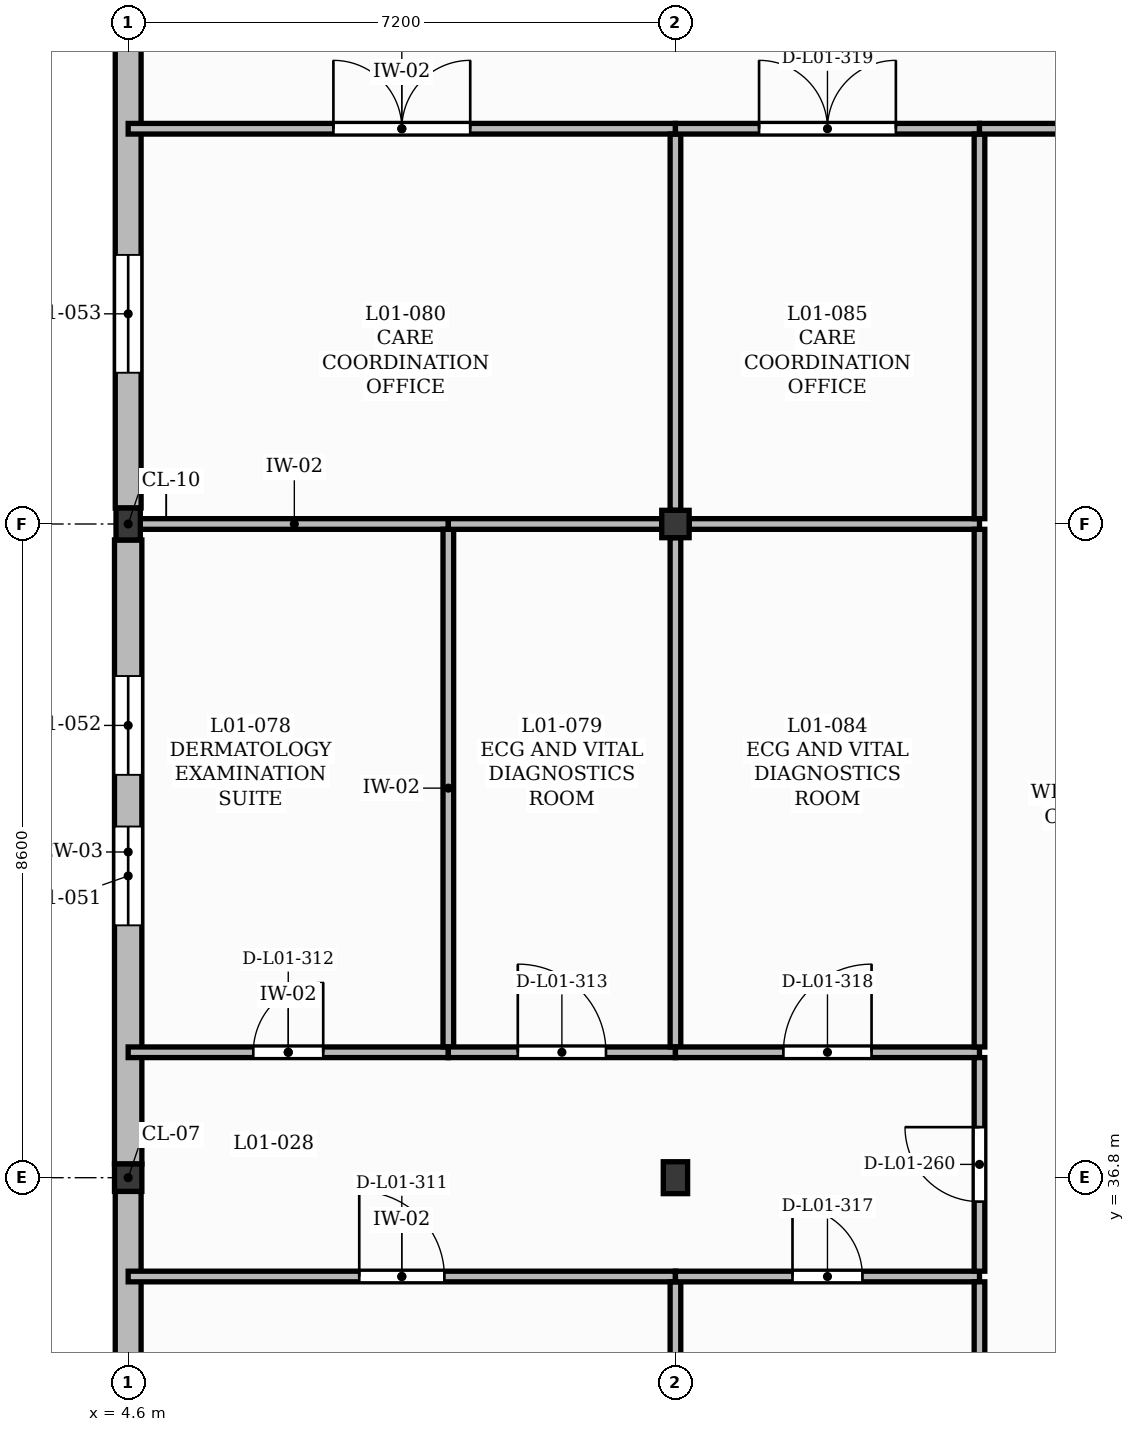
"""IFC4 building model, lengths in metres.
Left out: names, types, materials, properties, quantities, classifications, styles, units other than length and angle.
Written with IfcOpenShell. Run it as: python <this file> out.ifc"""

import sys

from ifc_helpers import new_model, si_unit, direction, frame, frame_2d, origin, origin_2d, place, context, subcontext, project, spatial, rectangle, extrude, element, fill, save


model = new_model("IFC4")
c1 = context("Model", 3, precision=1e-05, world=origin(), true_north=direction((0.0, 1.0)))
c2 = subcontext(c1, "Body", "Model", "MODEL_VIEW")
j1 = project(units=[si_unit("LENGTHUNIT", "METRE"), si_unit("PLANEANGLEUNIT", "RADIAN")], contexts=[c1])
p1 = place(None, origin())
s1 = spatial("IfcSite", under=j1, at=p1, CompositionType="ELEMENT")
p2 = place(p1, origin())
s2 = spatial("IfcBuilding", under=s1, at=p2, CompositionType="ELEMENT")
p3 = place(p2, frame((0.0, 0.0, 4.5)))
s3 = spatial("IfcBuildingStorey", under=s2, at=p3, CompositionType="ELEMENT", Elevation=4.5)
p4 = place(p3, frame((4.6, 36.8, 0.0), z_axis=(0.0, 0.0, 1.0), x_axis=(1.0, 0.0, 0.0)))
e1 = element("IfcColumn", 1, at=p4, inside=s3, PredefinedType="COLUMN", context=c2, shape_type="SweptSolid", body=[
    extrude(rectangle(XDim=0.36, YDim=0.36, at=origin_2d()), origin(), (0.0, 0.0, 1.0), 4.26),
])
for number, where, z_axis, x_axis in (
    (2, (4.6, 45.4, 0.0), (0.0, 0.0, 1.0), (1.0, 0.0, 0.0)),
    (3, (11.8, 36.8, 0.0), (0.0, 0.0, 1.0), (1.0, 0.0, 0.0)),
):
    element("IfcColumn", number, at=place(p3, frame(where, z_axis=z_axis, x_axis=x_axis)), inside=s3, PredefinedType="COLUMN", context=c2, shape_type="SweptSolid", body=[
        extrude(rectangle(XDim=0.32, YDim=0.42, at=origin_2d()), origin(), (0.0, 0.0, 1.0), 4.26),
    ])
p5 = place(p3, frame((11.8, 45.4, 0.0), z_axis=(0.0, 0.0, 1.0), x_axis=(1.0, 0.0, 0.0)))
e4 = element("IfcColumn", 4, at=p5, inside=s3, PredefinedType="COLUMN", context=c2, shape_type="SweptSolid", body=[
    extrude(rectangle(XDim=0.36, YDim=0.36, at=origin_2d()), origin(), (0.0, 0.0, 1.0), 4.26),
])
p6 = place(p3, frame((4.6, 27.41, 0.0), z_axis=(0.0, 0.0, 1.0), x_axis=(0.0, 1.0, 0.0)))
e5 = element("IfcWall", 5, at=p6, inside=s3, PredefinedType="SOLIDWALL", context=c2, shape_type="SweptSolid", body=[
    extrude(rectangle(XDim=9.21, YDim=0.34, at=frame_2d((4.605, 0.0))), origin(), (0.0, 0.0, 1.0), 3.8),
])
p7 = place(p6, frame((3.475, 0.0, 0.9)))
e6 = element("IfcOpeningElement", 6, at=p7, cuts=e5, PredefinedType="OPENING", context=c2, shape_type="SweptSolid", body=[
    extrude(rectangle(XDim=1.42, YDim=2.4, at=frame_2d((0.71, 1.2))), frame((0.0, 0.18, 0.0), z_axis=(0.0, -1.0, 0.0), x_axis=(1.0, 0.0, 0.0)), (0.0, 0.0, 1.0), 0.36),
])
p8 = place(p6, frame((5.575, 0.0, 0.9)))
e7 = element("IfcOpeningElement", 7, at=p8, cuts=e5, PredefinedType="OPENING", context=c2, shape_type="SweptSolid", body=[
    extrude(rectangle(XDim=1.42, YDim=2.4, at=frame_2d((0.71, 1.2))), frame((0.0, 0.18, 0.0), z_axis=(0.0, -1.0, 0.0), x_axis=(1.0, 0.0, 0.0)), (0.0, 0.0, 1.0), 0.36),
])
p9 = place(p3, frame((4.6, 36.98, 0.0), z_axis=(0.0, 0.0, 1.0), x_axis=(0.0, 1.0, 0.0)))
e8 = element("IfcWall", 8, at=p9, inside=s3, PredefinedType="SOLIDWALL", context=c2, shape_type="SweptSolid", body=[
    extrude(rectangle(XDim=8.21, YDim=0.36, at=frame_2d((4.105, 0.0))), origin(), (0.0, 0.0, 1.0), 3.8),
])
p10 = place(p9, frame((3.14, 0.0, 0.9)))
e9 = element("IfcOpeningElement", 9, at=p10, cuts=e8, PredefinedType="OPENING", context=c2, shape_type="SweptSolid", body=[
    extrude(rectangle(XDim=1.3, YDim=2.4, at=frame_2d((0.65, 1.2))), frame((0.0, 0.19, 0.0), z_axis=(0.0, -1.0, 0.0), x_axis=(1.0, 0.0, 0.0)), (0.0, 0.0, 1.0), 0.38),
])
p11 = place(p9, frame((5.12, 0.0, 0.9)))
e10 = element("IfcOpeningElement", 10, at=p11, cuts=e8, PredefinedType="OPENING", context=c2, shape_type="SweptSolid", body=[
    extrude(rectangle(XDim=1.3, YDim=2.4, at=frame_2d((0.65, 1.2))), frame((0.0, 0.19, 0.0), z_axis=(0.0, -1.0, 0.0), x_axis=(1.0, 0.0, 0.0)), (0.0, 0.0, 1.0), 0.38),
])
p12 = place(p3, frame((4.6, 45.61, 0.0), z_axis=(0.0, 0.0, 1.0), x_axis=(0.0, 1.0, 0.0)))
e11 = element("IfcWall", 11, at=p12, inside=s3, PredefinedType="SOLIDWALL", context=c2, shape_type="SweptSolid", body=[
    extrude(rectangle(XDim=6.81, YDim=0.34, at=frame_2d((3.405, 0.0))), origin(), (0.0, 0.0, 1.0), 3.8),
])
p13 = place(p12, frame((1.78, 0.0, 0.9)))
e12 = element("IfcOpeningElement", 12, at=p13, cuts=e11, PredefinedType="OPENING", context=c2, shape_type="SweptSolid", body=[
    extrude(rectangle(XDim=1.55, YDim=2.4, at=frame_2d((0.775, 1.2))), frame((0.0, 0.18, 0.0), z_axis=(0.0, -1.0, 0.0), x_axis=(1.0, 0.0, 0.0)), (0.0, 0.0, 1.0), 0.36),
])
p14 = place(p3, frame((4.6, 35.5, 0.0), z_axis=(0.0, 0.0, 1.0), x_axis=(1.0, 0.0, 0.0)))
e13 = element("IfcWall", 13, at=p14, inside=s3, PredefinedType="PARTITIONING", context=c2, shape_type="SweptSolid", body=[
    extrude(rectangle(XDim=7.2, YDim=0.14, at=frame_2d((3.6, 0.0))), origin(), (0.0, 0.0, 1.0), 4.18),
])
p15 = place(p14, frame((3.04, 0.0, 0.0)))
e14 = element("IfcOpeningElement", 14, at=p15, cuts=e13, PredefinedType="OPENING", context=c2, shape_type="SweptSolid", body=[
    extrude(rectangle(XDim=1.12, YDim=2.15, at=frame_2d((0.56, 1.075))), frame((0.0, 0.08, 0.0), z_axis=(0.0, -1.0, 0.0), x_axis=(1.0, 0.0, 0.0)), (0.0, 0.0, 1.0), 0.16),
])
p16 = place(p3, frame((4.6, 38.45, 0.0), z_axis=(0.0, 0.0, 1.0), x_axis=(1.0, 0.0, 0.0)))
e15 = element("IfcWall", 15, at=p16, inside=s3, PredefinedType="PARTITIONING", context=c2, shape_type="SweptSolid", body=[
    extrude(rectangle(XDim=4.212, YDim=0.14, at=frame_2d((2.106, 0.0))), origin(), (0.0, 0.0, 1.0), 4.18),
])
p17 = place(p16, frame((1.646, 0.0, 0.0)))
e16 = element("IfcOpeningElement", 16, at=p17, cuts=e15, PredefinedType="OPENING", context=c2, shape_type="SweptSolid", body=[
    extrude(rectangle(XDim=0.92, YDim=2.1, at=frame_2d((0.46, 1.05))), frame((0.0, 0.08, 0.0), z_axis=(0.0, -1.0, 0.0), x_axis=(1.0, 0.0, 0.0)), (0.0, 0.0, 1.0), 0.16),
])
p18 = place(p3, frame((4.76, 45.4, 0.0), z_axis=(0.0, 0.0, 1.0), x_axis=(1.0, 0.0, 0.0)))
e17 = element("IfcWall", 17, at=p18, inside=s3, PredefinedType="PARTITIONING", context=c2, shape_type="SweptSolid", body=[
    extrude(rectangle(XDim=4.052, YDim=0.14, at=frame_2d((2.026, 0.0))), origin(), (0.0, 0.0, 1.0), 3.66),
])
p19 = place(p3, frame((4.6, 50.6, 0.0), z_axis=(0.0, 0.0, 1.0), x_axis=(1.0, 0.0, 0.0)))
e18 = element("IfcWall", 18, at=p19, inside=s3, PredefinedType="PARTITIONING", context=c2, shape_type="SweptSolid", body=[
    extrude(rectangle(XDim=7.2, YDim=0.14, at=frame_2d((3.6, 0.0))), origin(), (0.0, 0.0, 1.0), 4.18),
])
p20 = place(p19, frame((2.7, 0.0, 0.0)))
e19 = element("IfcOpeningElement", 19, at=p20, cuts=e18, PredefinedType="OPENING", context=c2, shape_type="SweptSolid", body=[
    extrude(rectangle(XDim=1.8, YDim=2.3, at=frame_2d((0.9, 1.15))), frame((0.0, 0.08, 0.0), z_axis=(0.0, -1.0, 0.0), x_axis=(1.0, 0.0, 0.0)), (0.0, 0.0, 1.0), 0.16),
])
p21 = place(p3, frame((8.812, 38.52, 0.0), z_axis=(0.0, 0.0, 1.0), x_axis=(0.0, 1.0, 0.0)))
e20 = element("IfcWall", 20, at=p21, inside=s3, PredefinedType="PARTITIONING", context=c2, shape_type="SweptSolid", body=[
    extrude(rectangle(XDim=6.81, YDim=0.14, at=frame_2d((3.405, 0.0))), origin(), (0.0, 0.0, 1.0), 4.18),
])
p22 = place(p3, frame((8.812, 38.45, 0.0), z_axis=(0.0, 0.0, 1.0), x_axis=(1.0, 0.0, 0.0)))
e21 = element("IfcWall", 21, at=p22, inside=s3, PredefinedType="PARTITIONING", context=c2, shape_type="SweptSolid", body=[
    extrude(rectangle(XDim=2.988, YDim=0.14, at=frame_2d((1.494, 0.0))), origin(), (0.0, 0.0, 1.0), 4.18),
])
p23 = place(p22, frame((0.914, 0.0, 0.0)))
e22 = element("IfcOpeningElement", 22, at=p23, cuts=e21, PredefinedType="OPENING", context=c2, shape_type="SweptSolid", body=[
    extrude(rectangle(XDim=1.16, YDim=2.1, at=frame_2d((0.58, 1.05))), frame((0.0, 0.08, 0.0), z_axis=(0.0, -1.0, 0.0), x_axis=(1.0, 0.0, 0.0)), (0.0, 0.0, 1.0), 0.16),
])
p24 = place(p3, frame((8.812, 45.4, 0.0), z_axis=(0.0, 0.0, 1.0), x_axis=(1.0, 0.0, 0.0)))
e23 = element("IfcWall", 23, at=p24, inside=s3, PredefinedType="PARTITIONING", context=c2, shape_type="SweptSolid", body=[
    extrude(rectangle(XDim=2.808, YDim=0.14, at=frame_2d((1.404, 0.0))), origin(), (0.0, 0.0, 1.0), 3.66),
])
p25 = place(p3, frame((11.8, 31.279, 0.0), z_axis=(0.0, 0.0, 1.0), x_axis=(0.0, 1.0, 0.0)))
e24 = element("IfcWall", 24, at=p25, inside=s3, PredefinedType="PARTITIONING", context=c2, shape_type="SweptSolid", body=[
    extrude(rectangle(XDim=4.151, YDim=0.14, at=frame_2d((2.075, 0.0))), origin(), (0.0, 0.0, 1.0), 3.62),
])
p26 = place(p3, frame((11.8, 35.5, 0.0), z_axis=(0.0, 0.0, 1.0), x_axis=(1.0, 0.0, 0.0)))
e25 = element("IfcWall", 25, at=p26, inside=s3, PredefinedType="PARTITIONING", context=c2, shape_type="SweptSolid", body=[
    extrude(rectangle(XDim=4.0, YDim=0.14, at=frame_2d((2.0, 0.0))), origin(), (0.0, 0.0, 1.0), 4.18),
])
p27 = place(p26, frame((1.54, 0.0, 0.0)))
e26 = element("IfcOpeningElement", 26, at=p27, cuts=e25, PredefinedType="OPENING", context=c2, shape_type="SweptSolid", body=[
    extrude(rectangle(XDim=0.92, YDim=2.1, at=frame_2d((0.46, 1.05))), frame((0.0, 0.08, 0.0), z_axis=(0.0, -1.0, 0.0), x_axis=(1.0, 0.0, 0.0)), (0.0, 0.0, 1.0), 0.16),
])
p28 = place(p3, frame((11.8, 38.52, 0.0), z_axis=(0.0, 0.0, 1.0), x_axis=(0.0, 1.0, 0.0)))
e27 = element("IfcWall", 27, at=p28, inside=s3, PredefinedType="PARTITIONING", context=c2, shape_type="SweptSolid", body=[
    extrude(rectangle(XDim=6.7, YDim=0.14, at=frame_2d((3.35, 0.0))), origin(), (0.0, 0.0, 1.0), 3.62),
])
p29 = place(p3, frame((11.8, 38.45, 0.0), z_axis=(0.0, 0.0, 1.0), x_axis=(1.0, 0.0, 0.0)))
e28 = element("IfcWall", 28, at=p29, inside=s3, PredefinedType="PARTITIONING", context=c2, shape_type="SweptSolid", body=[
    extrude(rectangle(XDim=4.0, YDim=0.14, at=frame_2d((2.0, 0.0))), origin(), (0.0, 0.0, 1.0), 4.18),
])
p30 = place(p29, frame((1.42, 0.0, 0.0)))
e29 = element("IfcOpeningElement", 29, at=p30, cuts=e28, PredefinedType="OPENING", context=c2, shape_type="SweptSolid", body=[
    extrude(rectangle(XDim=1.16, YDim=2.1, at=frame_2d((0.58, 1.05))), frame((0.0, 0.08, 0.0), z_axis=(0.0, -1.0, 0.0), x_axis=(1.0, 0.0, 0.0)), (0.0, 0.0, 1.0), 0.16),
])
p31 = place(p3, frame((11.8, 45.58, 0.0), z_axis=(0.0, 0.0, 1.0), x_axis=(0.0, 1.0, 0.0)))
e30 = element("IfcWall", 30, at=p31, inside=s3, PredefinedType="PARTITIONING", context=c2, shape_type="SweptSolid", body=[
    extrude(rectangle(XDim=4.95, YDim=0.14, at=frame_2d((2.475, 0.0))), origin(), (0.0, 0.0, 1.0), 3.74),
])
p32 = place(p3, frame((11.98, 45.4, 0.0), z_axis=(0.0, 0.0, 1.0), x_axis=(1.0, 0.0, 0.0)))
e31 = element("IfcWall", 31, at=p32, inside=s3, PredefinedType="PARTITIONING", context=c2, shape_type="SweptSolid", body=[
    extrude(rectangle(XDim=3.82, YDim=0.14, at=frame_2d((1.91, 0.0))), origin(), (0.0, 0.0, 1.0), 3.62),
])
p33 = place(p3, frame((11.8, 50.6, 0.0), z_axis=(0.0, 0.0, 1.0), x_axis=(1.0, 0.0, 0.0)))
e32 = element("IfcWall", 32, at=p33, inside=s3, PredefinedType="PARTITIONING", context=c2, shape_type="SweptSolid", body=[
    extrude(rectangle(XDim=4.0, YDim=0.14, at=frame_2d((2.0, 0.0))), origin(), (0.0, 0.0, 1.0), 4.18),
])
p34 = place(p33, frame((1.1, 0.0, 0.0)))
e33 = element("IfcOpeningElement", 33, at=p34, cuts=e32, PredefinedType="OPENING", context=c2, shape_type="SweptSolid", body=[
    extrude(rectangle(XDim=1.8, YDim=2.3, at=frame_2d((0.9, 1.15))), frame((0.0, 0.08, 0.0), z_axis=(0.0, -1.0, 0.0), x_axis=(1.0, 0.0, 0.0)), (0.0, 0.0, 1.0), 0.16),
])
p35 = place(p3, frame((15.8, 31.279, 0.0), z_axis=(0.0, 0.0, 1.0), x_axis=(0.0, 1.0, 0.0)))
e34 = element("IfcWall", 34, at=p35, inside=s3, PredefinedType="PARTITIONING", context=c2, shape_type="SweptSolid", body=[
    extrude(rectangle(XDim=4.151, YDim=0.14, at=frame_2d((2.075, 0.0))), origin(), (0.0, 0.0, 1.0), 4.18),
])
p36 = place(p3, frame((15.8, 35.57, 0.0), z_axis=(0.0, 0.0, 1.0), x_axis=(0.0, 1.0, 0.0)))
e35 = element("IfcWall", 35, at=p36, inside=s3, PredefinedType="PARTITIONING", context=c2, shape_type="SweptSolid", body=[
    extrude(rectangle(XDim=2.81, YDim=0.14, at=frame_2d((1.405, 0.0))), origin(), (0.0, 0.0, 1.0), 4.18),
])
p37 = place(p36, frame((0.915, 0.0, 0.0)))
e36 = element("IfcOpeningElement", 36, at=p37, cuts=e35, PredefinedType="OPENING", context=c2, shape_type="SweptSolid", body=[
    extrude(rectangle(XDim=0.98, YDim=2.15, at=frame_2d((0.49, 1.075))), frame((0.0, 0.08, 0.0), z_axis=(0.0, -1.0, 0.0), x_axis=(1.0, 0.0, 0.0)), (0.0, 0.0, 1.0), 0.16),
])
p38 = place(p3, frame((15.8, 38.52, 0.0), z_axis=(0.0, 0.0, 1.0), x_axis=(0.0, 1.0, 0.0)))
e37 = element("IfcWall", 37, at=p38, inside=s3, PredefinedType="PARTITIONING", context=c2, shape_type="SweptSolid", body=[
    extrude(rectangle(XDim=6.81, YDim=0.14, at=frame_2d((3.405, 0.0))), origin(), (0.0, 0.0, 1.0), 4.18),
])
p39 = place(p3, frame((15.8, 45.47, 0.0), z_axis=(0.0, 0.0, 1.0), x_axis=(0.0, 1.0, 0.0)))
e38 = element("IfcWall", 38, at=p39, inside=s3, PredefinedType="PARTITIONING", context=c2, shape_type="SweptSolid", body=[
    extrude(rectangle(XDim=5.06, YDim=0.14, at=frame_2d((2.53, 0.0))), origin(), (0.0, 0.0, 1.0), 4.18),
])
p40 = place(p3, frame((15.8, 50.6, 0.0), z_axis=(0.0, 0.0, 1.0), x_axis=(1.0, 0.0, 0.0)))
e39 = element("IfcWall", 39, at=p40, inside=s3, PredefinedType="PARTITIONING", context=c2, shape_type="SweptSolid", body=[
    extrude(rectangle(XDim=3.2, YDim=0.14, at=frame_2d((1.6, 0.0))), origin(), (0.0, 0.0, 1.0), 4.18),
])
p41 = place(p40, frame((1.08, 0.0, 0.0)))
e40 = element("IfcOpeningElement", 40, at=p41, cuts=e39, PredefinedType="OPENING", context=c2, shape_type="SweptSolid", body=[
    extrude(rectangle(XDim=1.04, YDim=2.1, at=frame_2d((0.52, 1.05))), frame((0.0, 0.08, 0.0), z_axis=(0.0, -1.0, 0.0), x_axis=(1.0, 0.0, 0.0)), (0.0, 0.0, 1.0), 0.16),
])
p42 = place(p10, origin())
e41 = element("IfcWindow", 41, at=p42, inside=s3, PartitioningType="SINGLE_PANEL", PredefinedType="WINDOW", context=c2, shape_type="SweptSolid", body=[
    extrude(rectangle(XDim=1.3, YDim=2.4, at=frame_2d((0.65, 1.2))), frame((0.0, 0.03, 0.0), z_axis=(0.0, -1.0, 0.0), x_axis=(1.0, 0.0, 0.0)), (0.0, 0.0, 1.0), 0.06),
])
fill(e9, e41)
p43 = place(p11, origin())
e42 = element("IfcWindow", 42, at=p43, inside=s3, PartitioningType="SINGLE_PANEL", PredefinedType="WINDOW", context=c2, shape_type="SweptSolid", body=[
    extrude(rectangle(XDim=1.3, YDim=2.4, at=frame_2d((0.65, 1.2))), frame((0.0, 0.03, 0.0), z_axis=(0.0, -1.0, 0.0), x_axis=(1.0, 0.0, 0.0)), (0.0, 0.0, 1.0), 0.06),
])
fill(e10, e42)
p44 = place(p13, origin())
e43 = element("IfcWindow", 43, at=p44, inside=s3, PartitioningType="DOUBLE_PANEL_VERTICAL", PredefinedType="WINDOW", context=c2, shape_type="SweptSolid", body=[
    extrude(rectangle(XDim=1.55, YDim=2.4, at=frame_2d((0.775, 1.2))), frame((0.0, 0.03, 0.0), z_axis=(0.0, -1.0, 0.0), x_axis=(1.0, 0.0, 0.0)), (0.0, 0.0, 1.0), 0.06),
])
fill(e12, e43)
p45 = place(p37, origin())
e44 = element("IfcDoor", 44, at=p45, inside=s3, OperationType="SINGLE_SWING_RIGHT", PredefinedType="DOOR", context=c2, shape_type="SweptSolid", body=[
    extrude(rectangle(XDim=0.98, YDim=2.15, at=frame_2d((0.49, 1.075))), frame((0.0, 0.025, 0.0), z_axis=(0.0, -1.0, 0.0), x_axis=(1.0, 0.0, 0.0)), (0.0, 0.0, 1.0), 0.05),
])
fill(e36, e44)
p46 = place(p15, origin())
e45 = element("IfcDoor", 45, at=p46, inside=s3, OperationType="SINGLE_SWING_LEFT", PredefinedType="DOOR", context=c2, shape_type="SweptSolid", body=[
    extrude(rectangle(XDim=1.12, YDim=2.15, at=frame_2d((0.56, 1.075))), frame((0.0, 0.025, 0.0), z_axis=(0.0, -1.0, 0.0), x_axis=(1.0, 0.0, 0.0)), (0.0, 0.0, 1.0), 0.05),
])
fill(e14, e45)
p47 = place(p17, origin())
e46 = element("IfcDoor", 46, at=p47, inside=s3, OperationType="SINGLE_SWING_RIGHT", PredefinedType="DOOR", context=c2, shape_type="SweptSolid", body=[
    extrude(rectangle(XDim=0.92, YDim=2.1, at=frame_2d((0.46, 1.05))), frame((0.0, 0.025, 0.0), z_axis=(0.0, -1.0, 0.0), x_axis=(1.0, 0.0, 0.0)), (0.0, 0.0, 1.0), 0.05),
])
fill(e16, e46)
p48 = place(p23, origin())
e47 = element("IfcDoor", 47, at=p48, inside=s3, OperationType="SINGLE_SWING_LEFT", PredefinedType="DOOR", context=c2, shape_type="SweptSolid", body=[
    extrude(rectangle(XDim=1.16, YDim=2.1, at=frame_2d((0.58, 1.05))), frame((0.0, 0.025, 0.0), z_axis=(0.0, -1.0, 0.0), x_axis=(1.0, 0.0, 0.0)), (0.0, 0.0, 1.0), 0.05),
])
fill(e22, e47)
p49 = place(p20, origin())
e48 = element("IfcDoor", 48, at=p49, inside=s3, OperationType="DOUBLE_DOOR_SINGLE_SWING", PredefinedType="DOOR", context=c2, shape_type="SweptSolid", body=[
    extrude(rectangle(XDim=1.8, YDim=2.3, at=frame_2d((0.9, 1.15))), frame((0.0, 0.025, 0.0), z_axis=(0.0, -1.0, 0.0), x_axis=(1.0, 0.0, 0.0)), (0.0, 0.0, 1.0), 0.05),
])
fill(e19, e48)
p50 = place(p27, origin())
e49 = element("IfcDoor", 49, at=p50, inside=s3, OperationType="SINGLE_SWING_LEFT", PredefinedType="DOOR", context=c2, shape_type="SweptSolid", body=[
    extrude(rectangle(XDim=0.92, YDim=2.1, at=frame_2d((0.46, 1.05))), frame((0.0, 0.025, 0.0), z_axis=(0.0, -1.0, 0.0), x_axis=(1.0, 0.0, 0.0)), (0.0, 0.0, 1.0), 0.05),
])
fill(e26, e49)
p51 = place(p30, origin())
e50 = element("IfcDoor", 50, at=p51, inside=s3, OperationType="SINGLE_SWING_RIGHT", PredefinedType="DOOR", context=c2, shape_type="SweptSolid", body=[
    extrude(rectangle(XDim=1.16, YDim=2.1, at=frame_2d((0.58, 1.05))), frame((0.0, 0.025, 0.0), z_axis=(0.0, -1.0, 0.0), x_axis=(1.0, 0.0, 0.0)), (0.0, 0.0, 1.0), 0.05),
])
fill(e29, e50)
p52 = place(p34, origin())
e51 = element("IfcDoor", 51, at=p52, inside=s3, OperationType="DOUBLE_DOOR_SINGLE_SWING", PredefinedType="DOOR", context=c2, shape_type="SweptSolid", body=[
    extrude(rectangle(XDim=1.8, YDim=2.3, at=frame_2d((0.9, 1.15))), frame((0.0, 0.025, 0.0), z_axis=(0.0, -1.0, 0.0), x_axis=(1.0, 0.0, 0.0)), (0.0, 0.0, 1.0), 0.05),
])
fill(e33, e51)
save(model, sys.argv[1])
